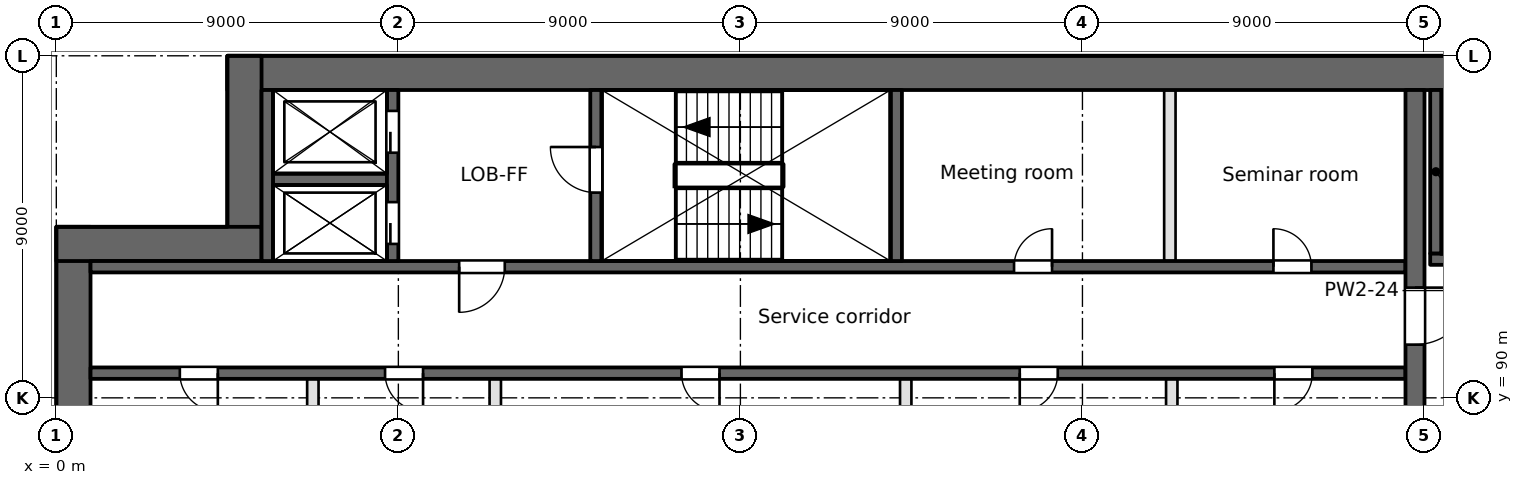
"""IFC4 building model, lengths in metres.
Left out: names, types, materials, properties, quantities, classifications, styles, units other than length and angle.
Written with IfcOpenShell. Run it as: python <this file> out.ifc"""

import sys

from ifc_helpers import new_model, si_unit, direction, frame, frame_2d, origin, place, context, subcontext, project, spatial, rectangle, extrude, element, fill, save


model = new_model("IFC4")
c1 = context("Model", 3, precision=1e-05, world=origin(), true_north=direction((0.0, 1.0)))
c2 = subcontext(c1, "Body", "Model", "MODEL_VIEW")
j1 = project(units=[si_unit("LENGTHUNIT", "METRE"), si_unit("PLANEANGLEUNIT", "RADIAN")], contexts=[c1])
p1 = place(None, origin())
s1 = spatial("IfcSite", under=j1, at=p1, CompositionType="ELEMENT")
p2 = place(p1, origin())
s2 = spatial("IfcBuilding", under=s1, at=p2, CompositionType="ELEMENT")
p3 = place(p2, frame((0.0, 0.0, 291.9)))
s3 = spatial("IfcBuildingStorey", under=s2, at=p3, CompositionType="ELEMENT", Elevation=291.9)
p4 = place(p3, frame((0.45, 94.5, 0.0), z_axis=(0.0, 0.0, 1.0), x_axis=(0.0, -1.0, 0.0)))
e1 = element("IfcWall", 1, at=p4, inside=s3, PredefinedType="SHEAR", context=c2, shape_type="SweptSolid", body=[
    extrude(rectangle(XDim=40.456, YDim=0.9, at=frame_2d((20.228, 0.0))), origin(), (0.0, 0.0, 1.0), 3.7),
])
p5 = place(p3, frame((49.5, 98.55, 0.0), z_axis=(0.0, 0.0, 1.0), x_axis=(-1.0, 0.0, 0.0)))
e2 = element("IfcWall", 2, at=p5, inside=s3, PredefinedType="SHEAR", context=c2, shape_type="SweptSolid", body=[
    extrude(rectangle(XDim=45.0, YDim=0.9, at=frame_2d((22.5, 0.0))), origin(), (0.0, 0.0, 1.0), 3.7),
])
for number, where, z_axis, x_axis in (
    (3, (4.95, 99.0, 0.0), (0.0, 0.0, 1.0), (0.0, -1.0, 0.0)),
    (4, (5.4, 94.05, 0.0), (0.0, 0.0, 1.0), (-1.0, 0.0, 0.0)),
):
    element("IfcWall", number, at=place(p3, frame(where, z_axis=z_axis, x_axis=x_axis)), inside=s3, PredefinedType="SHEAR", context=c2, shape_type="SweptSolid", body=[
        extrude(rectangle(XDim=5.4, YDim=0.9, at=frame_2d((2.7, 0.0))), origin(), (0.0, 0.0, 1.0), 3.7),
    ])
p6 = place(p3, frame((0.9, 90.65, -0.4), z_axis=(0.0, 0.0, 1.0), x_axis=(1.0, 0.0, 0.0)))
e5 = element("IfcWall", 5, at=p6, inside=s3, PredefinedType="SOLIDWALL", context=c2, shape_type="SweptSolid", body=[
    extrude(rectangle(XDim=34.6, YDim=0.3, at=frame_2d((17.3, 0.0))), origin(), (0.0, 0.0, 1.0), 3.7),
])
p7 = place(p6, frame((15.55, 0.0, 0.4)))
e6 = element("IfcOpeningElement", 6, at=p7, cuts=e5, PredefinedType="OPENING", context=c2, shape_type="SweptSolid", body=[
    extrude(rectangle(XDim=1.0, YDim=2.1, at=frame_2d((0.5, 1.05))), frame((0.0, 0.15, 0.0), z_axis=(0.0, -1.0, 0.0), x_axis=(1.0, 0.0, 0.0)), (0.0, 0.0, 1.0), 0.3),
])
p8 = place(p6, frame((2.35, 0.0, 0.4)))
e7 = element("IfcOpeningElement", 7, at=p8, cuts=e5, PredefinedType="OPENING", context=c2, shape_type="SweptSolid", body=[
    extrude(rectangle(XDim=1.0, YDim=2.1, at=frame_2d((0.5, 1.05))), frame((0.0, 0.15, 0.0), z_axis=(0.0, -1.0, 0.0), x_axis=(1.0, 0.0, 0.0)), (0.0, 0.0, 1.0), 0.3),
])
p9 = place(p6, frame((7.75, 0.0, 0.4)))
e8 = element("IfcOpeningElement", 8, at=p9, cuts=e5, PredefinedType="OPENING", context=c2, shape_type="SweptSolid", body=[
    extrude(rectangle(XDim=1.0, YDim=2.1, at=frame_2d((0.5, 1.05))), frame((0.0, 0.15, 0.0), z_axis=(0.0, -1.0, 0.0), x_axis=(1.0, 0.0, 0.0)), (0.0, 0.0, 1.0), 0.3),
])
p10 = place(p6, frame((24.45, 0.0, 0.4)))
e9 = element("IfcOpeningElement", 9, at=p10, cuts=e5, PredefinedType="OPENING", context=c2, shape_type="SweptSolid", body=[
    extrude(rectangle(XDim=1.0, YDim=2.1, at=frame_2d((0.5, 1.05))), frame((0.0, 0.15, 0.0), z_axis=(0.0, -1.0, 0.0), x_axis=(1.0, 0.0, 0.0)), (0.0, 0.0, 1.0), 0.3),
])
p11 = place(p6, frame((31.15, 0.0, 0.4)))
e10 = element("IfcOpeningElement", 10, at=p11, cuts=e5, PredefinedType="OPENING", context=c2, shape_type="SweptSolid", body=[
    extrude(rectangle(XDim=1.0, YDim=2.1, at=frame_2d((0.5, 1.05))), frame((0.0, 0.15, 0.0), z_axis=(0.0, -1.0, 0.0), x_axis=(1.0, 0.0, 0.0)), (0.0, 0.0, 1.0), 0.3),
])
p12 = place(p3, frame((0.9, 93.45, -0.4), z_axis=(0.0, 0.0, 1.0), x_axis=(1.0, 0.0, 0.0)))
e11 = element("IfcWall", 11, at=p12, inside=s3, PredefinedType="SOLIDWALL", context=c2, shape_type="SweptSolid", body=[
    extrude(rectangle(XDim=34.6, YDim=0.3, at=frame_2d((17.3, 0.0))), origin(), (0.0, 0.0, 1.0), 3.7),
])
p13 = place(p12, frame((9.7, 0.0, 0.4)))
e12 = element("IfcOpeningElement", 12, at=p13, cuts=e11, PredefinedType="OPENING", context=c2, shape_type="SweptSolid", body=[
    extrude(rectangle(XDim=1.2, YDim=2.1, at=frame_2d((0.6, 1.05))), frame((0.0, 0.15, 0.0), z_axis=(0.0, -1.0, 0.0), x_axis=(1.0, 0.0, 0.0)), (0.0, 0.0, 1.0), 0.3),
])
p14 = place(p12, frame((24.3, 0.0, 0.4)))
e13 = element("IfcOpeningElement", 13, at=p14, cuts=e11, PredefinedType="OPENING", context=c2, shape_type="SweptSolid", body=[
    extrude(rectangle(XDim=1.0, YDim=2.1, at=frame_2d((0.5, 1.05))), frame((0.0, 0.15, 0.0), z_axis=(0.0, -1.0, 0.0), x_axis=(1.0, 0.0, 0.0)), (0.0, 0.0, 1.0), 0.3),
])
p15 = place(p12, frame((31.125, 0.0, 0.4)))
e14 = element("IfcOpeningElement", 14, at=p15, cuts=e11, PredefinedType="OPENING", context=c2, shape_type="SweptSolid", body=[
    extrude(rectangle(XDim=1.0, YDim=2.1, at=frame_2d((0.5, 1.05))), frame((0.0, 0.15, 0.0), z_axis=(0.0, -1.0, 0.0), x_axis=(1.0, 0.0, 0.0)), (0.0, 0.0, 1.0), 0.3),
])
p16 = place(p3, frame((36.15, 93.65, -0.4), z_axis=(0.0, 0.0, 1.0), x_axis=(1.0, 0.0, 0.0)))
e15 = element("IfcWall", 15, at=p16, inside=s3, PredefinedType="SOLIDWALL", context=c2, shape_type="SweptSolid", body=[
    extrude(rectangle(XDim=8.2, YDim=0.3, at=frame_2d((4.1, 0.0))), origin(), (0.0, 0.0, 1.0), 3.7),
])
p17 = place(p16, frame((0.7, 0.0, 0.4)))
e16 = element("IfcOpeningElement", 16, at=p17, cuts=e15, PredefinedType="OPENING", context=c2, shape_type="SweptSolid", body=[
    extrude(rectangle(XDim=1.2, YDim=2.1, at=frame_2d((0.6, 1.05))), frame((0.0, 0.15, 0.0), z_axis=(0.0, -1.0, 0.0), x_axis=(1.0, 0.0, 0.0)), (0.0, 0.0, 1.0), 0.3),
])
p18 = place(p3, frame((5.7, 95.75, -0.4), z_axis=(0.0, 0.0, 1.0), x_axis=(1.0, 0.0, 0.0)))
e17 = element("IfcWall", 17, at=p18, inside=s3, PredefinedType="SOLIDWALL", context=c2, shape_type="SweptSolid", body=[
    extrude(rectangle(XDim=3.0, YDim=0.3, at=frame_2d((1.5, 0.0))), origin(), (0.0, 0.0, 1.0), 3.7),
])
p19 = place(p3, frame((5.55, 93.6, -0.4), z_axis=(0.0, 0.0, 1.0), x_axis=(0.0, 1.0, 0.0)))
e18 = element("IfcWall", 18, at=p19, inside=s3, PredefinedType="SOLIDWALL", context=c2, shape_type="SweptSolid", body=[
    extrude(rectangle(XDim=4.5, YDim=0.3, at=frame_2d((2.25, 0.0))), origin(), (0.0, 0.0, 1.0), 3.7),
])
p20 = place(p3, frame((6.75, 77.55, 0.0), z_axis=(0.0, 0.0, 1.0), x_axis=(0.0, 1.0, 0.0)))
e19 = element("IfcWall", 19, at=p20, inside=s3, PredefinedType="PARTITIONING", context=c2, shape_type="SweptSolid", body=[
    extrude(rectangle(XDim=12.95, YDim=0.3, at=frame_2d((6.475, 0.0))), origin(), (0.0, 0.0, 1.0), 3.3),
])
p21 = place(p3, frame((8.85, 93.6, -0.4), z_axis=(0.0, 0.0, 1.0), x_axis=(0.0, 1.0, 0.0)))
e20 = element("IfcWall", 20, at=p21, inside=s3, PredefinedType="SOLIDWALL", context=c2, shape_type="SweptSolid", body=[
    extrude(rectangle(XDim=4.5, YDim=0.3, at=frame_2d((2.25, 0.0))), origin(), (0.0, 0.0, 1.0), 3.7),
])
p22 = place(p21, frame((0.45, 0.0, 0.4)))
e21 = element("IfcOpeningElement", 21, at=p22, cuts=e20, PredefinedType="OPENING", context=c2, shape_type="SweptSolid", body=[
    extrude(rectangle(XDim=1.1, YDim=2.1, at=frame_2d((0.55, 1.05))), frame((0.0, 0.15, 0.0), z_axis=(0.0, -1.0, 0.0), x_axis=(1.0, 0.0, 0.0)), (0.0, 0.0, 1.0), 0.3),
])
p23 = place(p21, frame((2.85, 0.0, 0.4)))
e22 = element("IfcOpeningElement", 22, at=p23, cuts=e20, PredefinedType="OPENING", context=c2, shape_type="SweptSolid", body=[
    extrude(rectangle(XDim=1.1, YDim=2.1, at=frame_2d((0.55, 1.05))), frame((0.0, 0.15, 0.0), z_axis=(0.0, -1.0, 0.0), x_axis=(1.0, 0.0, 0.0)), (0.0, 0.0, 1.0), 0.3),
])
p24 = place(p3, frame((11.55, 87.95, 0.0), z_axis=(0.0, 0.0, 1.0), x_axis=(0.0, 1.0, 0.0)))
e23 = element("IfcWall", 23, at=p24, inside=s3, PredefinedType="PARTITIONING", context=c2, shape_type="SweptSolid", body=[
    extrude(rectangle(XDim=2.55, YDim=0.3, at=frame_2d((1.275, 0.0))), origin(), (0.0, 0.0, 1.0), 3.3),
])
p25 = place(p3, frame((14.2, 93.6, -0.4), z_axis=(0.0, 0.0, 1.0), x_axis=(0.0, 1.0, 0.0)))
e24 = element("IfcWall", 24, at=p25, inside=s3, PredefinedType="SOLIDWALL", context=c2, shape_type="SweptSolid", body=[
    extrude(rectangle(XDim=4.5, YDim=0.3, at=frame_2d((2.25, 0.0))), origin(), (0.0, 0.0, 1.0), 3.7),
])
p26 = place(p25, frame((1.8, 0.0, 0.4)))
e25 = element("IfcOpeningElement", 25, at=p26, cuts=e24, PredefinedType="OPENING", context=c2, shape_type="SweptSolid", body=[
    extrude(rectangle(XDim=1.2, YDim=2.1, at=frame_2d((0.6, 1.05))), frame((0.0, 0.15, 0.0), z_axis=(0.0, -1.0, 0.0), x_axis=(1.0, 0.0, 0.0)), (0.0, 0.0, 1.0), 0.3),
])
p27 = place(p3, frame((22.1, 93.6, -0.4), z_axis=(0.0, 0.0, 1.0), x_axis=(0.0, 1.0, 0.0)))
e26 = element("IfcWall", 26, at=p27, inside=s3, PredefinedType="SOLIDWALL", context=c2, shape_type="SweptSolid", body=[
    extrude(rectangle(XDim=4.5, YDim=0.3, at=frame_2d((2.25, 0.0))), origin(), (0.0, 0.0, 1.0), 3.7),
])
p28 = place(p3, frame((22.35, 87.95, 0.0), z_axis=(0.0, 0.0, 1.0), x_axis=(0.0, 1.0, 0.0)))
e27 = element("IfcWall", 27, at=p28, inside=s3, PredefinedType="PARTITIONING", context=c2, shape_type="SweptSolid", body=[
    extrude(rectangle(XDim=2.55, YDim=0.3, at=frame_2d((1.275, 0.0))), origin(), (0.0, 0.0, 1.0), 3.3),
])
p29 = place(p3, frame((29.3, 93.6, 0.0), z_axis=(0.0, 0.0, 1.0), x_axis=(0.0, 1.0, 0.0)))
e28 = element("IfcWall", 28, at=p29, inside=s3, PredefinedType="PARTITIONING", context=c2, shape_type="SweptSolid", body=[
    extrude(rectangle(XDim=4.5, YDim=0.3, at=frame_2d((2.25, 0.0))), origin(), (0.0, 0.0, 1.0), 3.3),
])
p30 = place(p3, frame((29.35, 77.55, 0.0), z_axis=(0.0, 0.0, 1.0), x_axis=(0.0, 1.0, 0.0)))
e29 = element("IfcWall", 29, at=p30, inside=s3, PredefinedType="PARTITIONING", context=c2, shape_type="SweptSolid", body=[
    extrude(rectangle(XDim=12.95, YDim=0.3, at=frame_2d((6.475, 0.0))), origin(), (0.0, 0.0, 1.0), 3.3),
])
p31 = place(p3, frame((35.75, 63.5, -0.4), z_axis=(0.0, 0.0, 1.0), x_axis=(0.0, 1.0, 0.0)))
e30 = element("IfcWall", 30, at=p31, inside=s3, PredefinedType="SOLIDWALL", context=c2, shape_type="SweptSolid", body=[
    extrude(rectangle(XDim=34.6, YDim=0.5, at=frame_2d((17.3, 0.0))), origin(), (0.0, 0.0, 1.0), 3.7),
])
p32 = place(p31, frame((9.7, 0.0, 0.4)))
e31 = element("IfcOpeningElement", 31, at=p32, cuts=e30, PredefinedType="OPENING", context=c2, shape_type="SweptSolid", body=[
    extrude(rectangle(XDim=2.4, YDim=2.1, at=frame_2d((1.2, 1.05))), frame((0.0, 0.25, 0.0), z_axis=(0.0, -1.0, 0.0), x_axis=(1.0, 0.0, 0.0)), (0.0, 0.0, 1.0), 0.5),
])
p33 = place(p31, frame((27.9, 0.0, 0.4)))
e32 = element("IfcOpeningElement", 32, at=p33, cuts=e30, PredefinedType="OPENING", context=c2, shape_type="SweptSolid", body=[
    extrude(rectangle(XDim=1.5, YDim=2.1, at=frame_2d((0.75, 1.05))), frame((0.0, 0.25, 0.0), z_axis=(0.0, -1.0, 0.0), x_axis=(1.0, 0.0, 0.0)), (0.0, 0.0, 1.0), 0.5),
])
p34 = place(p31, frame((1.5, 0.0, 0.4)))
e33 = element("IfcOpeningElement", 33, at=p34, cuts=e30, PredefinedType="OPENING", context=c2, shape_type="SweptSolid", body=[
    extrude(rectangle(XDim=1.2, YDim=2.1, at=frame_2d((0.6, 1.05))), frame((0.0, 0.25, 0.0), z_axis=(0.0, -1.0, 0.0), x_axis=(1.0, 0.0, 0.0)), (0.0, 0.0, 1.0), 0.5),
])
p35 = place(p3, frame((36.3, 93.8, -0.4), z_axis=(0.0, 0.0, 1.0), x_axis=(0.0, 1.0, 0.0)))
e34 = element("IfcWall", 34, at=p35, inside=s3, PredefinedType="SOLIDWALL", context=c2, shape_type="SweptSolid", body=[
    extrude(rectangle(XDim=4.3, YDim=0.3, at=frame_2d((2.15, 0.0))), origin(), (0.0, 0.0, 1.0), 3.7),
])
p36 = place(p22, origin())
e35 = element("IfcDoor", 35, at=p36, inside=s3, OperationType="SLIDING_TO_RIGHT", PredefinedType="DOOR", context=c2, shape_type="SweptSolid", body=[
    extrude(rectangle(XDim=1.1, YDim=2.1, at=frame_2d((0.55, 1.05))), frame((0.0, 0.025, 0.0), z_axis=(0.0, -1.0, 0.0), x_axis=(1.0, 0.0, 0.0)), (0.0, 0.0, 1.0), 0.05),
])
fill(e21, e35)
p37 = place(p23, origin())
e36 = element("IfcDoor", 36, at=p37, inside=s3, OperationType="SLIDING_TO_LEFT", PredefinedType="DOOR", context=c2, shape_type="SweptSolid", body=[
    extrude(rectangle(XDim=1.1, YDim=2.1, at=frame_2d((0.55, 1.05))), frame((0.0, 0.025, 0.0), z_axis=(0.0, -1.0, 0.0), x_axis=(1.0, 0.0, 0.0)), (0.0, 0.0, 1.0), 0.05),
])
fill(e22, e36)
p38 = place(p13, frame((1.2, 0.0, 0.0), z_axis=(0.0, 0.0, 1.0), x_axis=(-1.0, 0.0, 0.0)))
e37 = element("IfcDoor", 37, at=p38, inside=s3, OperationType="SINGLE_SWING_RIGHT", PredefinedType="DOOR", context=c2, shape_type="SweptSolid", body=[
    extrude(rectangle(XDim=1.2, YDim=2.1, at=frame_2d((0.6, 1.05))), frame((0.0, 0.025, 0.0), z_axis=(0.0, -1.0, 0.0), x_axis=(1.0, 0.0, 0.0)), (0.0, 0.0, 1.0), 0.05),
])
fill(e12, e37)
p39 = place(p33, frame((1.5, 0.0, 0.0), z_axis=(0.0, 0.0, 1.0), x_axis=(-1.0, 0.0, 0.0)))
e38 = element("IfcDoor", 38, at=p39, inside=s3, OperationType="SINGLE_SWING_LEFT", PredefinedType="DOOR", context=c2, shape_type="SweptSolid", body=[
    extrude(rectangle(XDim=1.5, YDim=2.1, at=frame_2d((0.75, 1.05))), frame((0.0, 0.025, 0.0), z_axis=(0.0, -1.0, 0.0), x_axis=(1.0, 0.0, 0.0)), (0.0, 0.0, 1.0), 0.05),
])
fill(e32, e38)
p40 = place(p26, origin())
e39 = element("IfcDoor", 39, at=p40, inside=s3, OperationType="SINGLE_SWING_RIGHT", PredefinedType="DOOR", context=c2, shape_type="SweptSolid", body=[
    extrude(rectangle(XDim=1.2, YDim=2.1, at=frame_2d((0.6, 1.05))), frame((0.0, 0.025, 0.0), z_axis=(0.0, -1.0, 0.0), x_axis=(1.0, 0.0, 0.0)), (0.0, 0.0, 1.0), 0.05),
])
fill(e25, e39)
p41 = place(p7, frame((1.0, 0.0, 0.0), z_axis=(0.0, 0.0, 1.0), x_axis=(-1.0, 0.0, 0.0)))
e40 = element("IfcDoor", 40, at=p41, inside=s3, OperationType="SINGLE_SWING_LEFT", PredefinedType="DOOR", context=c2, shape_type="SweptSolid", body=[
    extrude(rectangle(XDim=1.0, YDim=2.1, at=frame_2d((0.5, 1.05))), frame((0.0, 0.025, 0.0), z_axis=(0.0, -1.0, 0.0), x_axis=(1.0, 0.0, 0.0)), (0.0, 0.0, 1.0), 0.05),
])
fill(e6, e40)
p42 = place(p8, frame((1.0, 0.0, 0.0), z_axis=(0.0, 0.0, 1.0), x_axis=(-1.0, 0.0, 0.0)))
e41 = element("IfcDoor", 41, at=p42, inside=s3, OperationType="SINGLE_SWING_LEFT", PredefinedType="DOOR", context=c2, shape_type="SweptSolid", body=[
    extrude(rectangle(XDim=1.0, YDim=2.1, at=frame_2d((0.5, 1.05))), frame((0.0, 0.025, 0.0), z_axis=(0.0, -1.0, 0.0), x_axis=(1.0, 0.0, 0.0)), (0.0, 0.0, 1.0), 0.05),
])
fill(e7, e41)
p43 = place(p9, frame((1.0, 0.0, 0.0), z_axis=(0.0, 0.0, 1.0), x_axis=(-1.0, 0.0, 0.0)))
e42 = element("IfcDoor", 42, at=p43, inside=s3, OperationType="SINGLE_SWING_LEFT", PredefinedType="DOOR", context=c2, shape_type="SweptSolid", body=[
    extrude(rectangle(XDim=1.0, YDim=2.1, at=frame_2d((0.5, 1.05))), frame((0.0, 0.025, 0.0), z_axis=(0.0, -1.0, 0.0), x_axis=(1.0, 0.0, 0.0)), (0.0, 0.0, 1.0), 0.05),
])
fill(e8, e42)
p44 = place(p10, frame((1.0, 0.0, 0.0), z_axis=(0.0, 0.0, 1.0), x_axis=(-1.0, 0.0, 0.0)))
e43 = element("IfcDoor", 43, at=p44, inside=s3, OperationType="SINGLE_SWING_RIGHT", PredefinedType="DOOR", context=c2, shape_type="SweptSolid", body=[
    extrude(rectangle(XDim=1.0, YDim=2.1, at=frame_2d((0.5, 1.05))), frame((0.0, 0.025, 0.0), z_axis=(0.0, -1.0, 0.0), x_axis=(1.0, 0.0, 0.0)), (0.0, 0.0, 1.0), 0.05),
])
fill(e9, e43)
p45 = place(p11, frame((1.0, 0.0, 0.0), z_axis=(0.0, 0.0, 1.0), x_axis=(-1.0, 0.0, 0.0)))
e44 = element("IfcDoor", 44, at=p45, inside=s3, OperationType="SINGLE_SWING_RIGHT", PredefinedType="DOOR", context=c2, shape_type="SweptSolid", body=[
    extrude(rectangle(XDim=1.0, YDim=2.1, at=frame_2d((0.5, 1.05))), frame((0.0, 0.025, 0.0), z_axis=(0.0, -1.0, 0.0), x_axis=(1.0, 0.0, 0.0)), (0.0, 0.0, 1.0), 0.05),
])
fill(e10, e44)
p46 = place(p14, origin())
e45 = element("IfcDoor", 45, at=p46, inside=s3, OperationType="SINGLE_SWING_RIGHT", PredefinedType="DOOR", context=c2, shape_type="SweptSolid", body=[
    extrude(rectangle(XDim=1.0, YDim=2.1, at=frame_2d((0.5, 1.05))), frame((0.0, 0.025, 0.0), z_axis=(0.0, -1.0, 0.0), x_axis=(1.0, 0.0, 0.0)), (0.0, 0.0, 1.0), 0.05),
])
fill(e13, e45)
p47 = place(p15, origin())
e46 = element("IfcDoor", 46, at=p47, inside=s3, OperationType="SINGLE_SWING_LEFT", PredefinedType="DOOR", context=c2, shape_type="SweptSolid", body=[
    extrude(rectangle(XDim=1.0, YDim=2.1, at=frame_2d((0.5, 1.05))), frame((0.0, 0.025, 0.0), z_axis=(0.0, -1.0, 0.0), x_axis=(1.0, 0.0, 0.0)), (0.0, 0.0, 1.0), 0.05),
])
fill(e14, e46)
save(model, sys.argv[1])
